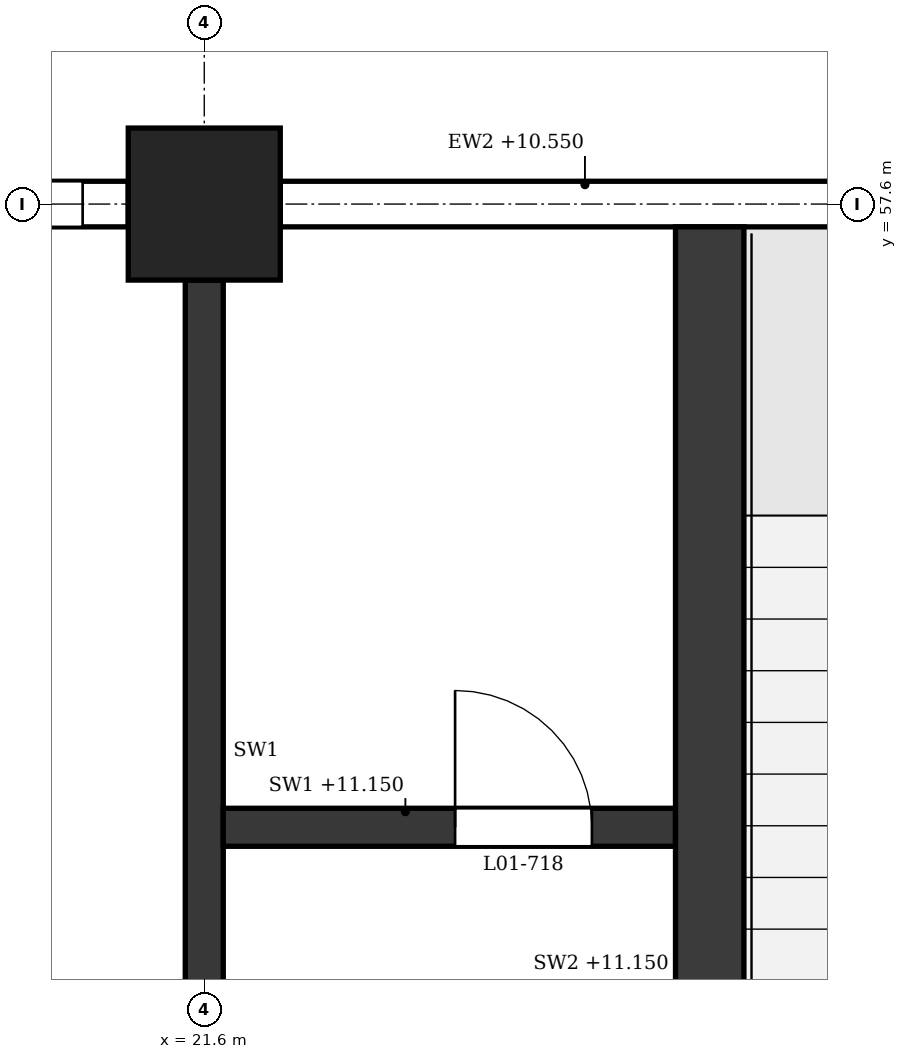
"""IFC4 building model, lengths in metres.
Left out: names, types, materials, properties, quantities, classifications, styles, units other than length and angle.
Written with IfcOpenShell. Run it as: python <this file> out.ifc"""

import sys

from ifc_helpers import new_model, si_unit, direction, frame, frame_2d, origin, origin_2d, place, context, subcontext, project, spatial, polyline, rectangle, outline, extrude, element, fill, save


model = new_model("IFC4")
c1 = context("Model", 3, precision=1e-05, world=origin(), true_north=direction((0.0, 1.0)))
c2 = subcontext(c1, "Body", "Model", "MODEL_VIEW")
j1 = project(units=[si_unit("LENGTHUNIT", "METRE"), si_unit("PLANEANGLEUNIT", "RADIAN")], contexts=[c1])
p1 = place(None, origin())
s1 = spatial("IfcSite", under=j1, at=p1, CompositionType="ELEMENT")
p2 = place(p1, origin())
s2 = spatial("IfcBuilding", under=s1, at=p2, CompositionType="ELEMENT")
p3 = place(p2, frame((0.0, 0.0, 6.0)))
s3 = spatial("IfcBuildingStorey", under=s2, at=p3, CompositionType="ELEMENT", Elevation=6.0)
p4 = place(p3, frame((21.6, 57.6, 0.0), z_axis=(0.0, 0.0, 1.0), x_axis=(1.0, 0.0, 0.0)))
e1 = element("IfcColumn", 1, at=p4, inside=s3, PredefinedType="COLUMN", context=c2, shape_type="SweptSolid", body=[
    extrude(rectangle(XDim=1.0, YDim=1.0, at=origin_2d()), origin(), (0.0, 0.0, 1.0), 5.4),
])
p5 = place(p3, frame((28.3, 57.6, 0.0), z_axis=(0.0, 0.0, 1.0), x_axis=(-1.0, 0.0, 0.0)))
e2 = element("IfcWall", 2, at=p5, inside=s3, PredefinedType="STANDARD", context=c2, shape_type="SweptSolid", body=[
    extrude(rectangle(XDim=6.2, YDim=0.3, at=frame_2d((3.1, 0.0))), origin(), (0.0, 0.0, 1.0), 4.55),
])
p6 = place(p5, frame((0.85, 0.0, 0.9)))
e3 = element("IfcOpeningElement", 3, at=p6, cuts=e2, PredefinedType="OPENING", context=c2, shape_type="SweptSolid", body=[
    extrude(outline(polyline([(0.0, 0.0), (0.9, 0.0), (0.9, 3.15), (0.45, 3.6), (0.0, 3.15), (0.0, 0.0)])), frame((0.0, 0.16, 0.0), z_axis=(0.0, -1.0, 0.0), x_axis=(1.0, 0.0, 0.0)), (0.0, 0.0, 1.0), 0.32),
])
p7 = place(p3, frame((21.1, 57.6, 0.0), z_axis=(0.0, 0.0, 1.0), x_axis=(-1.0, 0.0, 0.0)))
e4 = element("IfcWall", 4, at=p7, inside=s3, PredefinedType="STANDARD", context=c2, shape_type="SweptSolid", body=[
    extrude(rectangle(XDim=6.2, YDim=0.3, at=frame_2d((3.1, 0.0))), origin(), (0.0, 0.0, 1.0), 4.55),
])
p8 = place(p7, frame((0.3, 0.0, 0.9)))
e5 = element("IfcOpeningElement", 5, at=p8, cuts=e4, PredefinedType="OPENING", context=c2, shape_type="SweptSolid", body=[
    extrude(outline(polyline([(0.0, 0.0), (0.85, 0.0), (0.85, 3.15), (0.425, 3.6), (0.0, 3.15), (0.0, 0.0)])), frame((0.0, 0.16, 0.0), z_axis=(0.0, -1.0, 0.0), x_axis=(1.0, 0.0, 0.0)), (0.0, 0.0, 1.0), 0.32),
])
p9 = place(p7, frame((1.45, 0.0, 0.9)))
e6 = element("IfcOpeningElement", 6, at=p9, cuts=e4, PredefinedType="OPENING", context=c2, shape_type="SweptSolid", body=[
    extrude(outline(polyline([(0.0, 0.0), (0.85, 0.0), (0.85, 3.15), (0.425, 3.6), (0.0, 3.15), (0.0, 0.0)])), frame((0.0, 0.16, 0.0), z_axis=(0.0, -1.0, 0.0), x_axis=(1.0, 0.0, 0.0)), (0.0, 0.0, 1.0), 0.32),
])
p10 = place(p7, frame((3.9, 0.0, 0.9)))
e7 = element("IfcOpeningElement", 7, at=p10, cuts=e4, PredefinedType="OPENING", context=c2, shape_type="SweptSolid", body=[
    extrude(outline(polyline([(0.0, 0.0), (0.85, 0.0), (0.85, 3.15), (0.425, 3.6), (0.0, 3.15), (0.0, 0.0)])), frame((0.0, 0.16, 0.0), z_axis=(0.0, -1.0, 0.0), x_axis=(1.0, 0.0, 0.0)), (0.0, 0.0, 1.0), 0.32),
])
p11 = place(p7, frame((5.05, 0.0, 0.9)))
e8 = element("IfcOpeningElement", 8, at=p11, cuts=e4, PredefinedType="OPENING", context=c2, shape_type="SweptSolid", body=[
    extrude(outline(polyline([(0.0, 0.0), (0.85, 0.0), (0.85, 3.15), (0.425, 3.6), (0.0, 3.15), (0.0, 0.0)])), frame((0.0, 0.16, 0.0), z_axis=(0.0, -1.0, 0.0), x_axis=(1.0, 0.0, 0.0)), (0.0, 0.0, 1.0), 0.32),
])
p12 = place(p3, frame((21.6, 50.9, 0.0), z_axis=(0.0, 0.0, 1.0), x_axis=(0.0, 1.0, 0.0)))
e9 = element("IfcWall", 9, at=p12, inside=s3, PredefinedType="SHEAR", context=c2, shape_type="SweptSolid", body=[
    extrude(rectangle(XDim=6.2, YDim=0.25, at=frame_2d((3.1, 0.0))), origin(), (0.0, 0.0, 1.0), 4.4),
])
p13 = place(p3, frame((24.925, 50.525, 0.0), z_axis=(0.0, 0.0, 1.0), x_axis=(0.0, 1.0, 0.0)))
e10 = element("IfcWall", 10, at=p13, inside=s3, PredefinedType="SHEAR", context=c2, shape_type="SweptSolid", body=[
    extrude(rectangle(XDim=6.925, YDim=0.45, at=frame_2d((3.462, 0.0))), origin(), (0.0, 0.0, 1.0), 5.15),
])
p14 = place(p13, frame((0.525, 0.0, 0.0)))
e11 = element("IfcOpeningElement", 11, at=p14, cuts=e10, PredefinedType="OPENING", context=c2, shape_type="SweptSolid", body=[
    extrude(rectangle(XDim=1.0, YDim=2.1, at=frame_2d((0.5, 1.05))), frame((0.0, 0.235, 0.0), z_axis=(0.0, -1.0, 0.0), x_axis=(1.0, 0.0, 0.0)), (0.0, 0.0, 1.0), 0.47),
])
p15 = place(p3, frame((21.725, 53.5, 0.0), z_axis=(0.0, 0.0, 1.0), x_axis=(1.0, 0.0, 0.0)))
e12 = element("IfcWall", 12, at=p15, inside=s3, PredefinedType="SHEAR", context=c2, shape_type="SweptSolid", body=[
    extrude(rectangle(XDim=2.975, YDim=0.25, at=frame_2d((1.487, 0.0))), origin(), (0.0, 0.0, 1.0), 5.15),
])
p16 = place(p15, frame((1.525, 0.0, 0.0)))
e13 = element("IfcOpeningElement", 13, at=p16, cuts=e12, PredefinedType="OPENING", context=c2, shape_type="SweptSolid", body=[
    extrude(rectangle(XDim=0.9, YDim=2.1, at=frame_2d((0.45, 1.05))), frame((0.0, 0.135, 0.0), z_axis=(0.0, -1.0, 0.0), x_axis=(1.0, 0.0, 0.0)), (0.0, 0.0, 1.0), 0.27),
])
p17 = place(p8, origin())
e14 = element("IfcWindow", 14, at=p17, inside=s3, PartitioningType="SINGLE_PANEL", PredefinedType="WINDOW", context=c2, shape_type="SweptSolid", body=[
    extrude(outline(polyline([(0.0, 0.0), (0.85, 0.0), (0.85, 3.15), (0.425, 3.6), (0.0, 3.15), (0.0, 0.0)])), frame((0.0, 0.03, 0.0), z_axis=(0.0, -1.0, 0.0), x_axis=(1.0, 0.0, 0.0)), (0.0, 0.0, 1.0), 0.06),
])
fill(e5, e14)
p18 = place(p16, origin())
e15 = element("IfcDoor", 15, at=p18, inside=s3, OperationType="SINGLE_SWING_LEFT", PredefinedType="DOOR", context=c2, shape_type="SweptSolid", body=[
    extrude(rectangle(XDim=0.9, YDim=2.1, at=frame_2d((0.45, 1.05))), frame((0.0, 0.025, 0.0), z_axis=(0.0, -1.0, 0.0), x_axis=(1.0, 0.0, 0.0)), (0.0, 0.0, 1.0), 0.05),
])
fill(e13, e15)
save(model, sys.argv[1])
